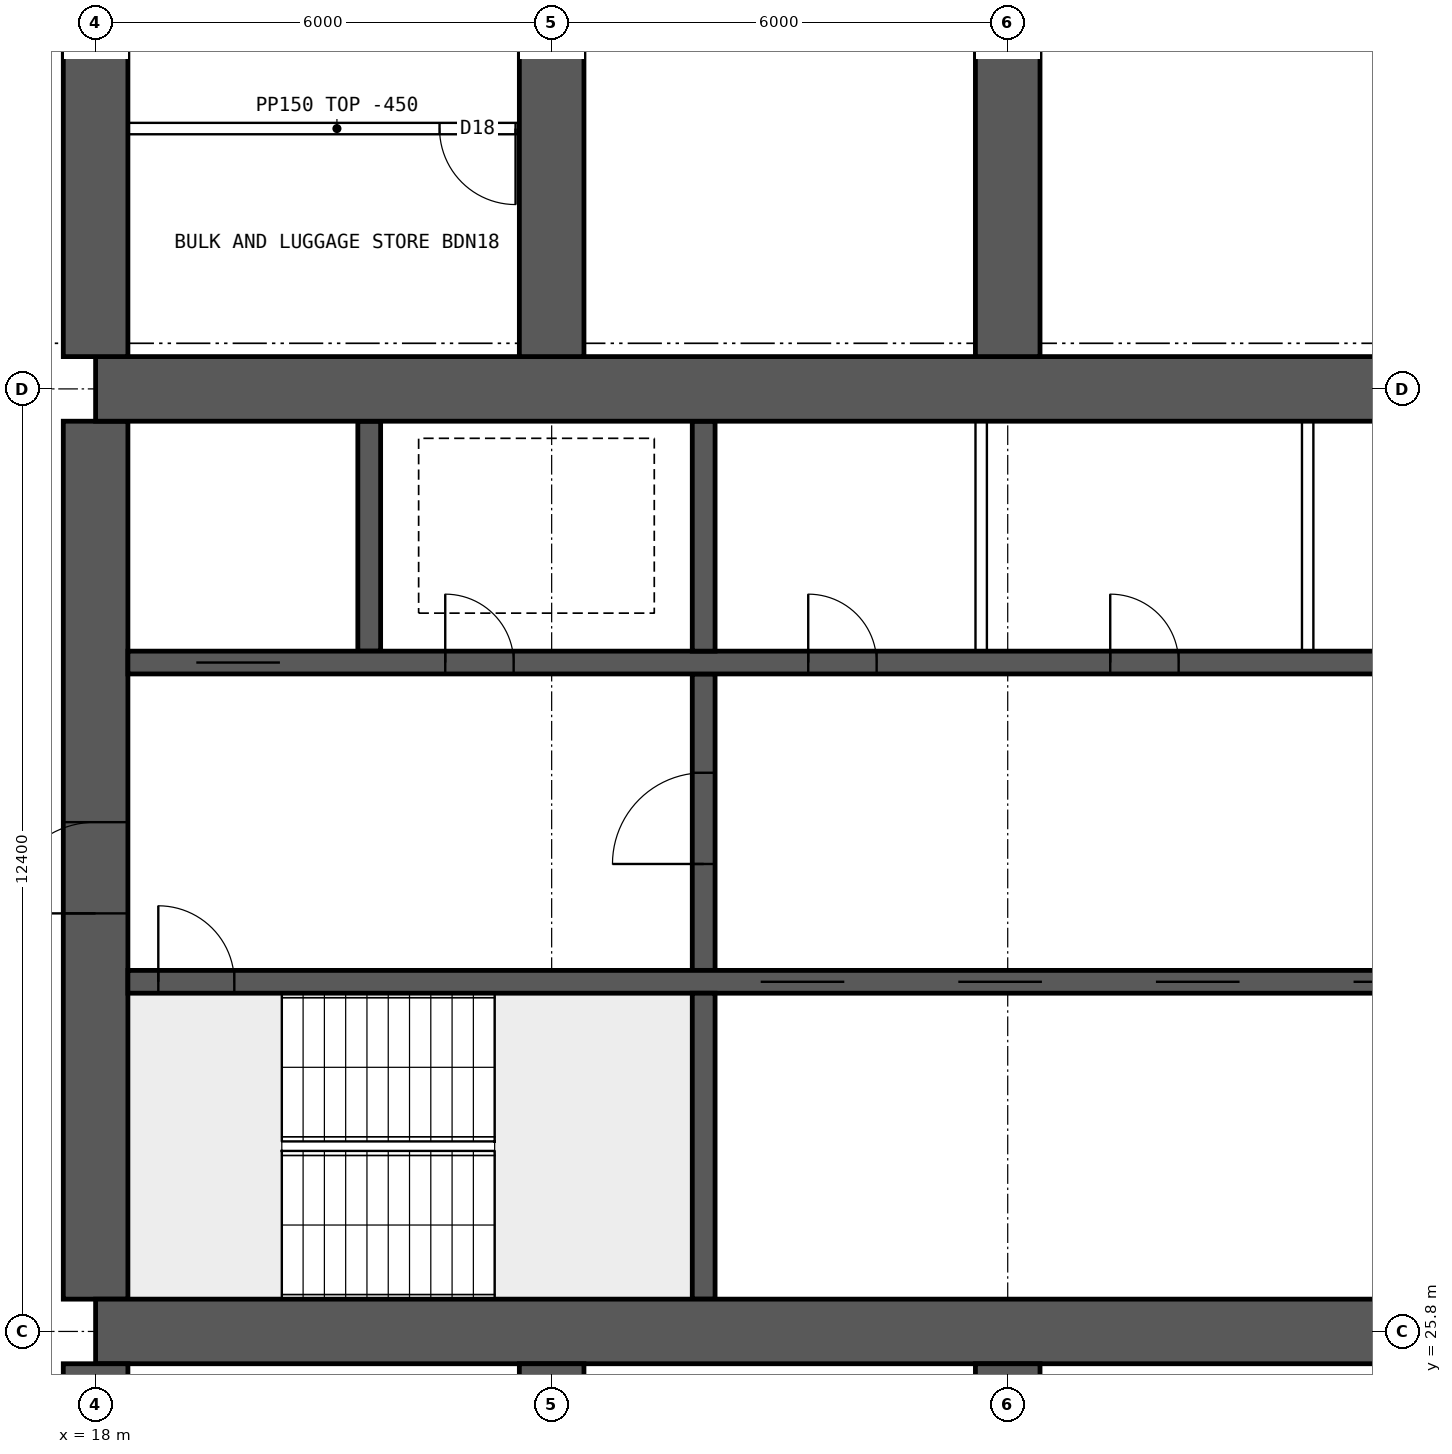
"""IFC4 building model, lengths in metres.
Left out: names, types, materials, properties, quantities, classifications, styles, units other than length and angle.
Written with IfcOpenShell. Run it as: python <this file> out.ifc"""

import sys

from ifc_helpers import new_model, si_unit, direction, frame, frame_2d, origin, place, context, subcontext, project, spatial, rectangle, extrude, element, fill, save


model = new_model("IFC4")
c1 = context("Model", 3, precision=1e-05, world=origin(), true_north=direction((0.0, 1.0)))
c2 = subcontext(c1, "Body", "Model", "MODEL_VIEW")
j1 = project(units=[si_unit("LENGTHUNIT", "METRE"), si_unit("PLANEANGLEUNIT", "RADIAN")], contexts=[c1])
p1 = place(None, origin())
s1 = spatial("IfcSite", under=j1, at=p1, CompositionType="ELEMENT")
p2 = place(p1, origin())
s2 = spatial("IfcBuilding", under=s1, at=p2, CompositionType="ELEMENT")
p3 = place(p2, frame((0.0, 0.0, 174.85)))
s3 = spatial("IfcBuildingStorey", under=s2, at=p3, CompositionType="ELEMENT", Elevation=174.85)
for number, where, z_axis, x_axis in (
    (1, (18.0, 25.8, 0.0), (0.0, 0.0, 1.0), (1.0, 0.0, 0.0)),
    (2, (18.0, 38.2, 0.0), (0.0, 0.0, 1.0), (1.0, 0.0, 0.0)),
):
    element("IfcWall", number, at=place(p3, frame(where, z_axis=z_axis, x_axis=x_axis)), inside=s3, PredefinedType="SHEAR", context=c2, shape_type="SweptSolid", body=[
        extrude(rectangle(XDim=48.0, YDim=0.85, at=frame_2d((24.0, 0.0))), origin(), (0.0, 0.0, 1.0), 3.75),
    ])
p4 = place(p3, frame((18.0, 26.225, 0.0), z_axis=(0.0, 0.0, 1.0), x_axis=(0.0, 1.0, 0.0)))
e3 = element("IfcWall", 3, at=p4, inside=s3, PredefinedType="SHEAR", context=c2, shape_type="SweptSolid", body=[
    extrude(rectangle(XDim=11.55, YDim=0.85, at=frame_2d((5.775, 0.0))), origin(), (0.0, 0.0, 1.0), 3.75),
])
p5 = place(p4, frame((5.075, 0.0, 0.0)))
e4 = element("IfcOpeningElement", 4, at=p5, cuts=e3, PredefinedType="OPENING", context=c2, shape_type="SweptSolid", body=[
    extrude(rectangle(XDim=1.2, YDim=2.1, at=frame_2d((0.6, 1.05))), frame((0.0, 0.435, 0.0), z_axis=(0.0, -1.0, 0.0), x_axis=(1.0, 0.0, 0.0)), (0.0, 0.0, 1.0), 0.87),
])
p6 = place(p3, frame((18.425, 30.4, 0.0), z_axis=(0.0, 0.0, 1.0), x_axis=(1.0, 0.0, 0.0)))
e5 = element("IfcWall", 5, at=p6, inside=s3, PredefinedType="SHEAR", context=c2, shape_type="SweptSolid", body=[
    extrude(rectangle(XDim=47.15, YDim=0.3, at=frame_2d((23.575, 0.0))), origin(), (0.0, 0.0, 1.0), 3.75),
])
p7 = place(p6, frame((0.4, 0.0, 0.0)))
e6 = element("IfcOpeningElement", 6, at=p7, cuts=e5, PredefinedType="OPENING", context=c2, shape_type="SweptSolid", body=[
    extrude(rectangle(XDim=1.0, YDim=2.1, at=frame_2d((0.5, 1.05))), frame((0.0, 0.16, 0.0), z_axis=(0.0, -1.0, 0.0), x_axis=(1.0, 0.0, 0.0)), (0.0, 0.0, 1.0), 0.32),
])
p8 = place(p6, frame((45.75, 0.0, 0.0)))
e7 = element("IfcOpeningElement", 7, at=p8, cuts=e5, PredefinedType="OPENING", context=c2, shape_type="SweptSolid", body=[
    extrude(rectangle(XDim=1.0, YDim=2.1, at=frame_2d((0.5, 1.05))), frame((0.0, 0.16, 0.0), z_axis=(0.0, -1.0, 0.0), x_axis=(1.0, 0.0, 0.0)), (0.0, 0.0, 1.0), 0.32),
])
p9 = place(p6, frame((8.325, 0.0, 0.0)))
e8 = element("IfcOpeningElement", 8, at=p9, cuts=e5, PredefinedType="OPENING", context=c2, shape_type="SweptSolid", body=[
    extrude(rectangle(XDim=1.1, YDim=2.1, at=frame_2d((0.55, 1.05))), frame((0.0, 0.16, 0.0), z_axis=(0.0, -1.0, 0.0), x_axis=(1.0, 0.0, 0.0)), (0.0, 0.0, 1.0), 0.32),
])
p10 = place(p6, frame((10.925, 0.0, 0.0)))
e9 = element("IfcOpeningElement", 9, at=p10, cuts=e5, PredefinedType="OPENING", context=c2, shape_type="SweptSolid", body=[
    extrude(rectangle(XDim=1.1, YDim=2.1, at=frame_2d((0.55, 1.05))), frame((0.0, 0.16, 0.0), z_axis=(0.0, -1.0, 0.0), x_axis=(1.0, 0.0, 0.0)), (0.0, 0.0, 1.0), 0.32),
])
p11 = place(p6, frame((13.525, 0.0, 0.0)))
e10 = element("IfcOpeningElement", 10, at=p11, cuts=e5, PredefinedType="OPENING", context=c2, shape_type="SweptSolid", body=[
    extrude(rectangle(XDim=1.1, YDim=2.1, at=frame_2d((0.55, 1.05))), frame((0.0, 0.16, 0.0), z_axis=(0.0, -1.0, 0.0), x_axis=(1.0, 0.0, 0.0)), (0.0, 0.0, 1.0), 0.32),
])
p12 = place(p6, frame((16.125, 0.0, 0.0)))
e11 = element("IfcOpeningElement", 11, at=p12, cuts=e5, PredefinedType="OPENING", context=c2, shape_type="SweptSolid", body=[
    extrude(rectangle(XDim=1.1, YDim=2.1, at=frame_2d((0.55, 1.05))), frame((0.0, 0.16, 0.0), z_axis=(0.0, -1.0, 0.0), x_axis=(1.0, 0.0, 0.0)), (0.0, 0.0, 1.0), 0.32),
])
p13 = place(p6, frame((18.9, 0.0, 0.0)))
e12 = element("IfcOpeningElement", 12, at=p13, cuts=e5, PredefinedType="OPENING", context=c2, shape_type="SweptSolid", body=[
    extrude(rectangle(XDim=0.9, YDim=2.1, at=frame_2d((0.45, 1.05))), frame((0.0, 0.16, 0.0), z_axis=(0.0, -1.0, 0.0), x_axis=(1.0, 0.0, 0.0)), (0.0, 0.0, 1.0), 0.32),
])
p14 = place(p6, frame((30.192, 0.0, 0.0)))
e13 = element("IfcOpeningElement", 13, at=p14, cuts=e5, PredefinedType="OPENING", context=c2, shape_type="SweptSolid", body=[
    extrude(rectangle(XDim=1.1, YDim=2.1, at=frame_2d((0.55, 1.05))), frame((0.0, 0.16, 0.0), z_axis=(0.0, -1.0, 0.0), x_axis=(1.0, 0.0, 0.0)), (0.0, 0.0, 1.0), 0.32),
])
p15 = place(p6, frame((33.725, 0.0, 0.0)))
e14 = element("IfcOpeningElement", 14, at=p15, cuts=e5, PredefinedType="OPENING", context=c2, shape_type="SweptSolid", body=[
    extrude(rectangle(XDim=1.1, YDim=2.1, at=frame_2d((0.55, 1.05))), frame((0.0, 0.16, 0.0), z_axis=(0.0, -1.0, 0.0), x_axis=(1.0, 0.0, 0.0)), (0.0, 0.0, 1.0), 0.32),
])
p16 = place(p6, frame((37.258, 0.0, 0.0)))
e15 = element("IfcOpeningElement", 15, at=p16, cuts=e5, PredefinedType="OPENING", context=c2, shape_type="SweptSolid", body=[
    extrude(rectangle(XDim=1.1, YDim=2.1, at=frame_2d((0.55, 1.05))), frame((0.0, 0.16, 0.0), z_axis=(0.0, -1.0, 0.0), x_axis=(1.0, 0.0, 0.0)), (0.0, 0.0, 1.0), 0.32),
])
p17 = place(p3, frame((18.425, 34.6, 0.0), z_axis=(0.0, 0.0, 1.0), x_axis=(1.0, 0.0, 0.0)))
e16 = element("IfcWall", 16, at=p17, inside=s3, PredefinedType="SHEAR", context=c2, shape_type="SweptSolid", body=[
    extrude(rectangle(XDim=47.15, YDim=0.3, at=frame_2d((23.575, 0.0))), origin(), (0.0, 0.0, 1.0), 3.75),
])
p18 = place(p17, frame((0.9, 0.0, 0.0)))
e17 = element("IfcOpeningElement", 17, at=p18, cuts=e16, PredefinedType="OPENING", context=c2, shape_type="SweptSolid", body=[
    extrude(rectangle(XDim=1.1, YDim=2.1, at=frame_2d((0.55, 1.05))), frame((0.0, 0.16, 0.0), z_axis=(0.0, -1.0, 0.0), x_axis=(1.0, 0.0, 0.0)), (0.0, 0.0, 1.0), 0.32),
])
p19 = place(p17, frame((45.15, 0.0, 0.0)))
e18 = element("IfcOpeningElement", 18, at=p19, cuts=e16, PredefinedType="OPENING", context=c2, shape_type="SweptSolid", body=[
    extrude(rectangle(XDim=1.1, YDim=2.1, at=frame_2d((0.55, 1.05))), frame((0.0, 0.16, 0.0), z_axis=(0.0, -1.0, 0.0), x_axis=(1.0, 0.0, 0.0)), (0.0, 0.0, 1.0), 0.32),
])
p20 = place(p17, frame((4.175, 0.0, 0.0)))
e19 = element("IfcOpeningElement", 19, at=p20, cuts=e16, PredefinedType="OPENING", context=c2, shape_type="SweptSolid", body=[
    extrude(rectangle(XDim=0.9, YDim=2.1, at=frame_2d((0.45, 1.05))), frame((0.0, 0.16, 0.0), z_axis=(0.0, -1.0, 0.0), x_axis=(1.0, 0.0, 0.0)), (0.0, 0.0, 1.0), 0.32),
])
p21 = place(p17, frame((42.075, 0.0, 0.0)))
e20 = element("IfcOpeningElement", 20, at=p21, cuts=e16, PredefinedType="OPENING", context=c2, shape_type="SweptSolid", body=[
    extrude(rectangle(XDim=0.9, YDim=2.1, at=frame_2d((0.45, 1.05))), frame((0.0, 0.16, 0.0), z_axis=(0.0, -1.0, 0.0), x_axis=(1.0, 0.0, 0.0)), (0.0, 0.0, 1.0), 0.32),
])
p22 = place(p17, frame((8.95, 0.0, 0.0)))
e21 = element("IfcOpeningElement", 21, at=p22, cuts=e16, PredefinedType="OPENING", context=c2, shape_type="SweptSolid", body=[
    extrude(rectangle(XDim=0.9, YDim=2.1, at=frame_2d((0.45, 1.05))), frame((0.0, 0.16, 0.0), z_axis=(0.0, -1.0, 0.0), x_axis=(1.0, 0.0, 0.0)), (0.0, 0.0, 1.0), 0.32),
])
p23 = place(p17, frame((12.924, 0.0, 0.0)))
e22 = element("IfcOpeningElement", 22, at=p23, cuts=e16, PredefinedType="OPENING", context=c2, shape_type="SweptSolid", body=[
    extrude(rectangle(XDim=0.9, YDim=2.1, at=frame_2d((0.45, 1.05))), frame((0.0, 0.16, 0.0), z_axis=(0.0, -1.0, 0.0), x_axis=(1.0, 0.0, 0.0)), (0.0, 0.0, 1.0), 0.32),
])
p24 = place(p17, frame((16.571, 0.0, 0.0)))
e23 = element("IfcOpeningElement", 23, at=p24, cuts=e16, PredefinedType="OPENING", context=c2, shape_type="SweptSolid", body=[
    extrude(rectangle(XDim=0.9, YDim=2.1, at=frame_2d((0.45, 1.05))), frame((0.0, 0.16, 0.0), z_axis=(0.0, -1.0, 0.0), x_axis=(1.0, 0.0, 0.0)), (0.0, 0.0, 1.0), 0.32),
])
p25 = place(p17, frame((20.33, 0.0, 0.0)))
e24 = element("IfcOpeningElement", 24, at=p25, cuts=e16, PredefinedType="OPENING", context=c2, shape_type="SweptSolid", body=[
    extrude(rectangle(XDim=0.9, YDim=2.1, at=frame_2d((0.45, 1.05))), frame((0.0, 0.16, 0.0), z_axis=(0.0, -1.0, 0.0), x_axis=(1.0, 0.0, 0.0)), (0.0, 0.0, 1.0), 0.32),
])
p26 = place(p17, frame((24.736, 0.0, 0.0)))
e25 = element("IfcOpeningElement", 25, at=p26, cuts=e16, PredefinedType="OPENING", context=c2, shape_type="SweptSolid", body=[
    extrude(rectangle(XDim=0.9, YDim=2.1, at=frame_2d((0.45, 1.05))), frame((0.0, 0.16, 0.0), z_axis=(0.0, -1.0, 0.0), x_axis=(1.0, 0.0, 0.0)), (0.0, 0.0, 1.0), 0.32),
])
p27 = place(p17, frame((27.533, 0.0, 0.0)))
e26 = element("IfcOpeningElement", 26, at=p27, cuts=e16, PredefinedType="OPENING", context=c2, shape_type="SweptSolid", body=[
    extrude(rectangle(XDim=0.9, YDim=2.1, at=frame_2d((0.45, 1.05))), frame((0.0, 0.16, 0.0), z_axis=(0.0, -1.0, 0.0), x_axis=(1.0, 0.0, 0.0)), (0.0, 0.0, 1.0), 0.32),
])
p28 = place(p17, frame((29.5, 0.0, 0.0)))
e27 = element("IfcOpeningElement", 27, at=p28, cuts=e16, PredefinedType="OPENING", context=c2, shape_type="SweptSolid", body=[
    extrude(rectangle(XDim=0.9, YDim=2.1, at=frame_2d((0.45, 1.05))), frame((0.0, 0.16, 0.0), z_axis=(0.0, -1.0, 0.0), x_axis=(1.0, 0.0, 0.0)), (0.0, 0.0, 1.0), 0.32),
])
p29 = place(p17, frame((31.932, 0.0, 0.0)))
e28 = element("IfcOpeningElement", 28, at=p29, cuts=e16, PredefinedType="OPENING", context=c2, shape_type="SweptSolid", body=[
    extrude(rectangle(XDim=0.9, YDim=2.1, at=frame_2d((0.45, 1.05))), frame((0.0, 0.16, 0.0), z_axis=(0.0, -1.0, 0.0), x_axis=(1.0, 0.0, 0.0)), (0.0, 0.0, 1.0), 0.32),
])
p30 = place(p17, frame((34.667, 0.0, 0.0)))
e29 = element("IfcOpeningElement", 29, at=p30, cuts=e16, PredefinedType="OPENING", context=c2, shape_type="SweptSolid", body=[
    extrude(rectangle(XDim=0.9, YDim=2.1, at=frame_2d((0.45, 1.05))), frame((0.0, 0.16, 0.0), z_axis=(0.0, -1.0, 0.0), x_axis=(1.0, 0.0, 0.0)), (0.0, 0.0, 1.0), 0.32),
])
p31 = place(p17, frame((37.707, 0.0, 0.0)))
e30 = element("IfcOpeningElement", 30, at=p31, cuts=e16, PredefinedType="OPENING", context=c2, shape_type="SweptSolid", body=[
    extrude(rectangle(XDim=0.9, YDim=2.1, at=frame_2d((0.45, 1.05))), frame((0.0, 0.16, 0.0), z_axis=(0.0, -1.0, 0.0), x_axis=(1.0, 0.0, 0.0)), (0.0, 0.0, 1.0), 0.32),
])
p32 = place(p3, frame((26.0, 26.225, 0.0), z_axis=(0.0, 0.0, 1.0), x_axis=(0.0, 1.0, 0.0)))
e31 = element("IfcWall", 31, at=p32, inside=s3, PredefinedType="SHEAR", context=c2, shape_type="SweptSolid", body=[
    extrude(rectangle(XDim=4.025, YDim=0.3, at=frame_2d((2.012, 0.0))), origin(), (0.0, 0.0, 1.0), 3.75),
])
p33 = place(p3, frame((26.0, 30.55, 0.0), z_axis=(0.0, 0.0, 1.0), x_axis=(0.0, 1.0, 0.0)))
e32 = element("IfcWall", 32, at=p33, inside=s3, PredefinedType="SHEAR", context=c2, shape_type="SweptSolid", body=[
    extrude(rectangle(XDim=3.9, YDim=0.3, at=frame_2d((1.95, 0.0))), origin(), (0.0, 0.0, 1.0), 3.75),
])
p34 = place(p33, frame((1.4, 0.0, 0.0)))
e33 = element("IfcOpeningElement", 33, at=p34, cuts=e32, PredefinedType="OPENING", context=c2, shape_type="SweptSolid", body=[
    extrude(rectangle(XDim=1.2, YDim=2.1, at=frame_2d((0.6, 1.05))), frame((0.0, 0.16, 0.0), z_axis=(0.0, -1.0, 0.0), x_axis=(1.0, 0.0, 0.0)), (0.0, 0.0, 1.0), 0.32),
])
for number, where, z_axis, x_axis in (
    (34, (21.6, 34.75, 0.0), (0.0, 0.0, 1.0), (0.0, 1.0, 0.0)),
    (35, (26.0, 34.75, 0.0), (0.0, 0.0, 1.0), (0.0, 1.0, 0.0)),
):
    element("IfcWall", number, at=place(p3, frame(where, z_axis=z_axis, x_axis=x_axis)), inside=s3, PredefinedType="SHEAR", context=c2, shape_type="SweptSolid", body=[
        extrude(rectangle(XDim=3.025, YDim=0.3, at=frame_2d((1.512, 0.0))), origin(), (0.0, 0.0, 1.0), 3.75),
    ])
for number, where, z_axis, x_axis in (
    (36, (18.0, 17.2, 0.0), (0.0, 0.0, 1.0), (0.0, 1.0, 0.0)),
    (37, (18.0, 38.625, 0.0), (0.0, 0.0, 1.0), (0.0, 1.0, 0.0)),
    (38, (24.0, 17.2, 0.0), (0.0, 0.0, 1.0), (0.0, 1.0, 0.0)),
    (39, (24.0, 38.625, 0.0), (0.0, 0.0, 1.0), (0.0, 1.0, 0.0)),
    (40, (30.0, 17.2, 0.0), (0.0, 0.0, 1.0), (0.0, 1.0, 0.0)),
    (41, (30.0, 38.625, 0.0), (0.0, 0.0, 1.0), (0.0, 1.0, 0.0)),
):
    element("IfcWall", number, at=place(p3, frame(where, z_axis=z_axis, x_axis=x_axis)), inside=s3, PredefinedType="SHEAR", context=c2, shape_type="SweptSolid", body=[
        extrude(rectangle(XDim=8.175, YDim=0.85, at=frame_2d((4.087, 0.0))), origin(), (0.0, 0.0, 1.0), 3.75),
    ])
for number, where, z_axis, x_axis in (
    (42, (29.651, 34.75, 0.0), (0.0, 0.0, 1.0), (0.0, 1.0, 0.0)),
    (43, (33.946, 34.75, 0.0), (0.0, 0.0, 1.0), (0.0, 1.0, 0.0)),
):
    element("IfcWall", number, at=place(p3, frame(where, z_axis=z_axis, x_axis=x_axis)), inside=s3, PredefinedType="SOLIDWALL", context=c2, shape_type="SweptSolid", body=[
        extrude(rectangle(XDim=3.025, YDim=0.15, at=frame_2d((1.512, 0.0))), origin(), (0.0, 0.0, 1.0), 3.3),
    ])
p35 = place(p3, frame((23.925, 41.625, 0.0), z_axis=(0.0, 0.0, 1.0), x_axis=(-1.0, 0.0, 0.0)))
e44 = element("IfcWall", 44, at=p35, inside=s3, PredefinedType="PARTITIONING", context=c2, shape_type="SweptSolid", body=[
    extrude(rectangle(XDim=5.5, YDim=0.15, at=frame_2d((2.75, 0.0))), origin(), (0.0, 0.0, 1.0), 3.3),
])
p36 = place(p35, frame((0.4, 0.0, 0.0)))
e45 = element("IfcOpeningElement", 45, at=p36, cuts=e44, PredefinedType="OPENING", context=c2, shape_type="SweptSolid", body=[
    extrude(rectangle(XDim=1.0, YDim=2.1, at=frame_2d((0.5, 1.05))), frame((0.0, 0.085, 0.0), z_axis=(0.0, -1.0, 0.0), x_axis=(1.0, 0.0, 0.0)), (0.0, 0.0, 1.0), 0.17),
])
p37 = place(p5, origin())
e46 = element("IfcDoor", 46, at=p37, inside=s3, OperationType="SINGLE_SWING_LEFT", PredefinedType="DOOR", context=c2, shape_type="SweptSolid", body=[
    extrude(rectangle(XDim=1.2, YDim=2.1, at=frame_2d((0.6, 1.05))), frame((0.0, 0.025, 0.0), z_axis=(0.0, -1.0, 0.0), x_axis=(1.0, 0.0, 0.0)), (0.0, 0.0, 1.0), 0.05),
])
fill(e4, e46)
p38 = place(p7, origin())
e47 = element("IfcDoor", 47, at=p38, inside=s3, OperationType="SINGLE_SWING_LEFT", PredefinedType="DOOR", context=c2, shape_type="SweptSolid", body=[
    extrude(rectangle(XDim=1.0, YDim=2.1, at=frame_2d((0.5, 1.05))), frame((0.0, 0.025, 0.0), z_axis=(0.0, -1.0, 0.0), x_axis=(1.0, 0.0, 0.0)), (0.0, 0.0, 1.0), 0.05),
])
fill(e6, e47)
p39 = place(p18, origin())
e48 = element("IfcDoor", 48, at=p39, inside=s3, OperationType="DOUBLE_DOOR_SLIDING", PredefinedType="DOOR", context=c2, shape_type="SweptSolid", body=[
    extrude(rectangle(XDim=1.1, YDim=2.1, at=frame_2d((0.55, 1.05))), frame((0.0, 0.025, 0.0), z_axis=(0.0, -1.0, 0.0), x_axis=(1.0, 0.0, 0.0)), (0.0, 0.0, 1.0), 0.05),
])
fill(e17, e48)
p40 = place(p20, origin())
e49 = element("IfcDoor", 49, at=p40, inside=s3, OperationType="SINGLE_SWING_LEFT", PredefinedType="DOOR", context=c2, shape_type="SweptSolid", body=[
    extrude(rectangle(XDim=0.9, YDim=2.1, at=frame_2d((0.45, 1.05))), frame((0.0, 0.025, 0.0), z_axis=(0.0, -1.0, 0.0), x_axis=(1.0, 0.0, 0.0)), (0.0, 0.0, 1.0), 0.05),
])
fill(e19, e49)
p41 = place(p34, origin())
e50 = element("IfcDoor", 50, at=p41, inside=s3, OperationType="SINGLE_SWING_LEFT", PredefinedType="DOOR", context=c2, shape_type="SweptSolid", body=[
    extrude(rectangle(XDim=1.2, YDim=2.1, at=frame_2d((0.6, 1.05))), frame((0.0, 0.025, 0.0), z_axis=(0.0, -1.0, 0.0), x_axis=(1.0, 0.0, 0.0)), (0.0, 0.0, 1.0), 0.05),
])
fill(e33, e50)
p42 = place(p22, origin())
e51 = element("IfcDoor", 51, at=p42, inside=s3, OperationType="SINGLE_SWING_LEFT", PredefinedType="DOOR", context=c2, shape_type="SweptSolid", body=[
    extrude(rectangle(XDim=0.9, YDim=2.1, at=frame_2d((0.45, 1.05))), frame((0.0, 0.025, 0.0), z_axis=(0.0, -1.0, 0.0), x_axis=(1.0, 0.0, 0.0)), (0.0, 0.0, 1.0), 0.05),
])
fill(e21, e51)
p43 = place(p23, origin())
e52 = element("IfcDoor", 52, at=p43, inside=s3, OperationType="SINGLE_SWING_LEFT", PredefinedType="DOOR", context=c2, shape_type="SweptSolid", body=[
    extrude(rectangle(XDim=0.9, YDim=2.1, at=frame_2d((0.45, 1.05))), frame((0.0, 0.025, 0.0), z_axis=(0.0, -1.0, 0.0), x_axis=(1.0, 0.0, 0.0)), (0.0, 0.0, 1.0), 0.05),
])
fill(e22, e52)
p44 = place(p9, origin())
e53 = element("IfcDoor", 53, at=p44, inside=s3, OperationType="DOUBLE_DOOR_SLIDING", PredefinedType="DOOR", context=c2, shape_type="SweptSolid", body=[
    extrude(rectangle(XDim=1.1, YDim=2.1, at=frame_2d((0.55, 1.05))), frame((0.0, 0.025, 0.0), z_axis=(0.0, -1.0, 0.0), x_axis=(1.0, 0.0, 0.0)), (0.0, 0.0, 1.0), 0.05),
])
fill(e8, e53)
p45 = place(p10, origin())
e54 = element("IfcDoor", 54, at=p45, inside=s3, OperationType="DOUBLE_DOOR_SLIDING", PredefinedType="DOOR", context=c2, shape_type="SweptSolid", body=[
    extrude(rectangle(XDim=1.1, YDim=2.1, at=frame_2d((0.55, 1.05))), frame((0.0, 0.025, 0.0), z_axis=(0.0, -1.0, 0.0), x_axis=(1.0, 0.0, 0.0)), (0.0, 0.0, 1.0), 0.05),
])
fill(e9, e54)
p46 = place(p11, origin())
e55 = element("IfcDoor", 55, at=p46, inside=s3, OperationType="DOUBLE_DOOR_SLIDING", PredefinedType="DOOR", context=c2, shape_type="SweptSolid", body=[
    extrude(rectangle(XDim=1.1, YDim=2.1, at=frame_2d((0.55, 1.05))), frame((0.0, 0.025, 0.0), z_axis=(0.0, -1.0, 0.0), x_axis=(1.0, 0.0, 0.0)), (0.0, 0.0, 1.0), 0.05),
])
fill(e10, e55)
p47 = place(p12, origin())
e56 = element("IfcDoor", 56, at=p47, inside=s3, OperationType="DOUBLE_DOOR_SLIDING", PredefinedType="DOOR", context=c2, shape_type="SweptSolid", body=[
    extrude(rectangle(XDim=1.1, YDim=2.1, at=frame_2d((0.55, 1.05))), frame((0.0, 0.025, 0.0), z_axis=(0.0, -1.0, 0.0), x_axis=(1.0, 0.0, 0.0)), (0.0, 0.0, 1.0), 0.05),
])
fill(e11, e56)
p48 = place(p36, origin())
e57 = element("IfcDoor", 57, at=p48, inside=s3, OperationType="SINGLE_SWING_LEFT", PredefinedType="DOOR", context=c2, shape_type="SweptSolid", body=[
    extrude(rectangle(XDim=1.0, YDim=2.1, at=frame_2d((0.5, 1.05))), frame((0.0, 0.025, 0.0), z_axis=(0.0, -1.0, 0.0), x_axis=(1.0, 0.0, 0.0)), (0.0, 0.0, 1.0), 0.05),
])
fill(e45, e57)
save(model, sys.argv[1])
